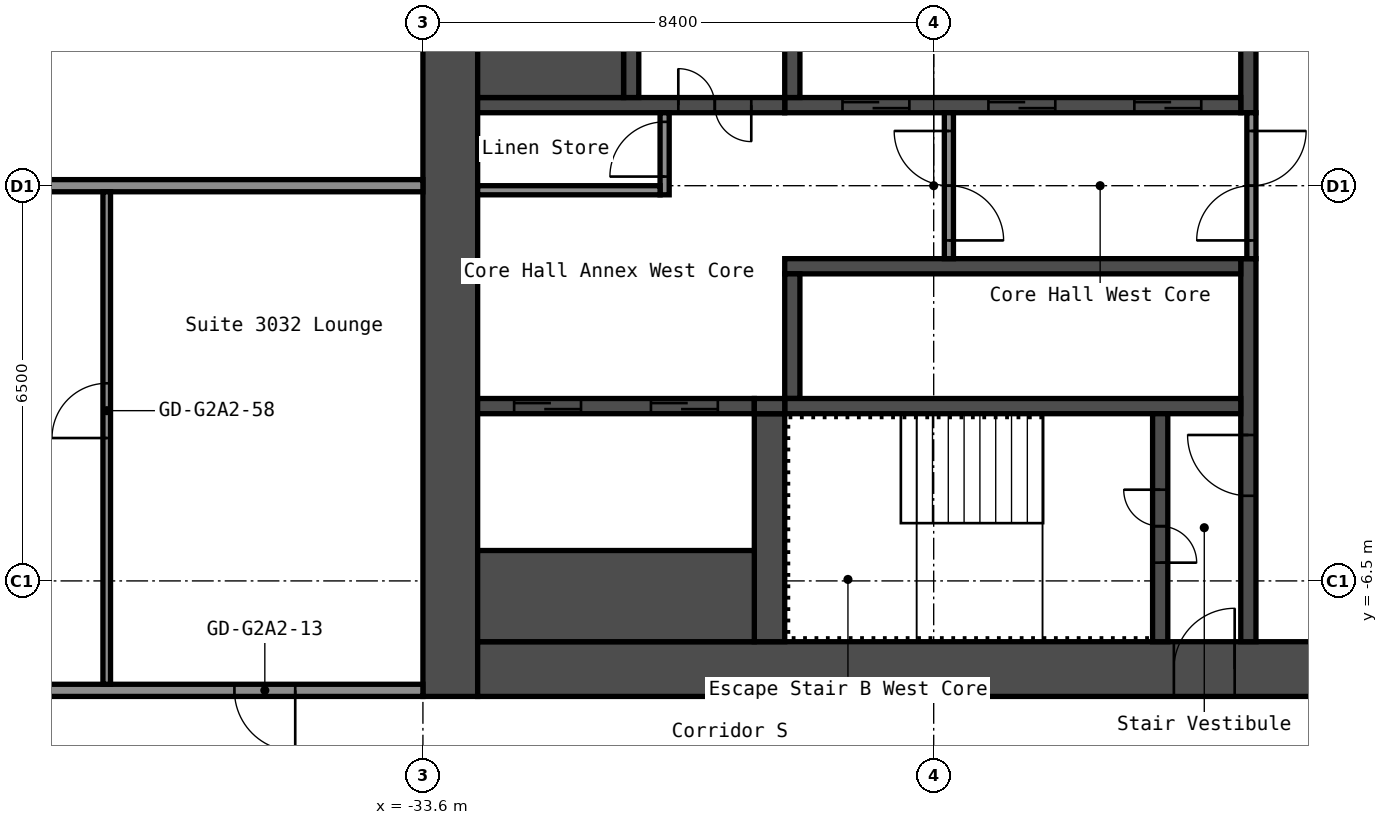
"""IFC4 building model, lengths in metres.
Left out: names, types, materials, properties, quantities, classifications, styles, units other than length and angle.
Written with IfcOpenShell. Run it as: python <this file> out.ifc"""

import sys

from ifc_helpers import new_model, si_unit, direction, frame, frame_2d, origin, place, context, subcontext, project, spatial, rectangle, extrude, element, fill, save


model = new_model("IFC4")
c1 = context("Model", 3, precision=1e-05, world=origin(), true_north=direction((0.0, 1.0)))
c2 = subcontext(c1, "Body", "Model", "MODEL_VIEW")
j1 = project(units=[si_unit("LENGTHUNIT", "METRE"), si_unit("PLANEANGLEUNIT", "RADIAN")], contexts=[c1])
p1 = place(None, origin())
s1 = spatial("IfcSite", under=j1, at=p1, CompositionType="ELEMENT")
p2 = place(p1, origin())
s2 = spatial("IfcBuilding", under=s1, at=p2, CompositionType="ELEMENT")
p3 = place(p2, frame((0.0, 0.0, 107.4)))
s3 = spatial("IfcBuildingStorey", under=s2, at=p3, CompositionType="ELEMENT", Elevation=107.4)
p4 = place(p3, frame((-33.15, -8.4, 0.0), z_axis=(0.0, 0.0, 1.0), x_axis=(0.0, 1.0, 0.0)))
e1 = element("IfcWall", 1, at=p4, inside=s3, PredefinedType="SHEAR", context=c2, shape_type="SweptSolid", body=[
    extrude(rectangle(XDim=16.8, YDim=0.9, at=frame_2d((8.4, 0.0))), origin(), (0.0, 0.0, 1.0), 2.8),
])
p5 = place(p3, frame((-32.7, -7.95, 0.0), z_axis=(0.0, 0.0, 1.0), x_axis=(1.0, 0.0, 0.0)))
e2 = element("IfcWall", 2, at=p5, inside=s3, PredefinedType="SHEAR", context=c2, shape_type="SweptSolid", body=[
    extrude(rectangle(XDim=15.0, YDim=0.9, at=frame_2d((7.5, 0.0))), origin(), (0.0, 0.0, 1.0), 2.8),
])
p6 = place(p5, frame((11.45, 0.0, 0.0)))
e3 = element("IfcOpeningElement", 3, at=p6, cuts=e2, PredefinedType="OPENING", context=c2, shape_type="SweptSolid", body=[
    extrude(rectangle(XDim=1.0, YDim=2.1, at=frame_2d((0.5, 1.05))), frame((0.0, 0.46, 0.0), z_axis=(0.0, -1.0, 0.0), x_axis=(1.0, 0.0, 0.0)), (0.0, 0.0, 1.0), 0.92),
])
p7 = place(p3, frame((-20.025, 1.2, 0.0), z_axis=(0.0, 0.0, 1.0), x_axis=(0.0, 1.0, 0.0)))
e4 = element("IfcWall", 4, at=p7, inside=s3, PredefinedType="SHEAR", context=c2, shape_type="SweptSolid", body=[
    extrude(rectangle(XDim=6.3, YDim=0.25, at=frame_2d((3.15, 0.0))), origin(), (0.0, 0.0, 1.0), 2.8),
])
p8 = place(p3, frame((-20.025, -7.5, 0.0), z_axis=(0.0, 0.0, 1.0), x_axis=(0.0, 1.0, 0.0)))
e5 = element("IfcWall", 5, at=p8, inside=s3, PredefinedType="SHEAR", context=c2, shape_type="SweptSolid", body=[
    extrude(rectangle(XDim=6.3, YDim=0.25, at=frame_2d((3.15, 0.0))), origin(), (0.0, 0.0, 1.0), 2.8),
])
p9 = place(p8, frame((2.4, 0.0, 0.0)))
e6 = element("IfcOpeningElement", 6, at=p9, cuts=e5, PredefinedType="OPENING", context=c2, shape_type="SweptSolid", body=[
    extrude(rectangle(XDim=1.0, YDim=2.1, at=frame_2d((0.5, 1.05))), frame((0.0, 0.135, 0.0), z_axis=(0.0, -1.0, 0.0), x_axis=(1.0, 0.0, 0.0)), (0.0, 0.0, 1.0), 0.27),
])
p10 = place(p3, frame((-27.65, 1.325, 0.0), z_axis=(0.0, 0.0, 1.0), x_axis=(1.0, 0.0, 0.0)))
e7 = element("IfcWall", 7, at=p10, inside=s3, PredefinedType="SHEAR", context=c2, shape_type="SweptSolid", body=[
    extrude(rectangle(XDim=7.5, YDim=0.25, at=frame_2d((3.75, 0.0))), origin(), (0.0, 0.0, 1.0), 2.8),
])
p11 = place(p10, frame((5.75, 0.0, 0.0)))
e8 = element("IfcOpeningElement", 8, at=p11, cuts=e7, PredefinedType="OPENING", context=c2, shape_type="SweptSolid", body=[
    extrude(rectangle(XDim=1.1, YDim=2.1, at=frame_2d((0.55, 1.05))), frame((0.0, 0.135, 0.0), z_axis=(0.0, -1.0, 0.0), x_axis=(1.0, 0.0, 0.0)), (0.0, 0.0, 1.0), 0.27),
])
p12 = place(p10, frame((3.35, 0.0, 0.0)))
e9 = element("IfcOpeningElement", 9, at=p12, cuts=e7, PredefinedType="OPENING", context=c2, shape_type="SweptSolid", body=[
    extrude(rectangle(XDim=1.1, YDim=2.1, at=frame_2d((0.55, 1.05))), frame((0.0, 0.135, 0.0), z_axis=(0.0, -1.0, 0.0), x_axis=(1.0, 0.0, 0.0)), (0.0, 0.0, 1.0), 0.27),
])
p13 = place(p10, frame((0.95, 0.0, 0.0)))
e10 = element("IfcOpeningElement", 10, at=p13, cuts=e7, PredefinedType="OPENING", context=c2, shape_type="SweptSolid", body=[
    extrude(rectangle(XDim=1.1, YDim=2.1, at=frame_2d((0.55, 1.05))), frame((0.0, 0.135, 0.0), z_axis=(0.0, -1.0, 0.0), x_axis=(1.0, 0.0, 0.0)), (0.0, 0.0, 1.0), 0.27),
])
p14 = place(p3, frame((-27.525, 1.45, 0.0), z_axis=(0.0, 0.0, 1.0), x_axis=(0.0, 1.0, 0.0)))
e11 = element("IfcWall", 11, at=p14, inside=s3, PredefinedType="SHEAR", context=c2, shape_type="SweptSolid", body=[
    extrude(rectangle(XDim=2.05, YDim=0.25, at=frame_2d((1.025, 0.0))), origin(), (0.0, 0.0, 1.0), 2.8),
])
p15 = place(p3, frame((-32.7, 1.325, 0.0), z_axis=(0.0, 0.0, 1.0), x_axis=(1.0, 0.0, 0.0)))
e12 = element("IfcWall", 12, at=p15, inside=s3, PredefinedType="SHEAR", context=c2, shape_type="SweptSolid", body=[
    extrude(rectangle(XDim=5.05, YDim=0.25, at=frame_2d((2.525, 0.0))), origin(), (0.0, 0.0, 1.0), 2.8),
])
p16 = place(p15, frame((3.3, 0.0, 0.0)))
e13 = element("IfcOpeningElement", 13, at=p16, cuts=e12, PredefinedType="OPENING", context=c2, shape_type="SweptSolid", body=[
    extrude(rectangle(XDim=1.2, YDim=2.1, at=frame_2d((0.6, 1.05))), frame((0.0, 0.135, 0.0), z_axis=(0.0, -1.0, 0.0), x_axis=(1.0, 0.0, 0.0)), (0.0, 0.0, 1.0), 0.27),
])
p17 = place(p3, frame((-30.175, 1.45, 0.0), z_axis=(0.0, 0.0, 1.0), x_axis=(0.0, 1.0, 0.0)))
e14 = element("IfcWall", 14, at=p17, inside=s3, PredefinedType="SHEAR", context=c2, shape_type="SweptSolid", body=[
    extrude(rectangle(XDim=6.05, YDim=0.25, at=frame_2d((3.025, 0.0))), origin(), (0.0, 0.0, 1.0), 2.8),
])
p18 = place(p17, frame((2.625, 0.0, 0.0)))
e15 = element("IfcOpeningElement", 15, at=p18, cuts=e14, PredefinedType="OPENING", context=c2, shape_type="SweptSolid", body=[
    extrude(rectangle(XDim=1.1, YDim=2.1, at=frame_2d((0.55, 1.05))), frame((0.0, 0.135, 0.0), z_axis=(0.0, -1.0, 0.0), x_axis=(1.0, 0.0, 0.0)), (0.0, 0.0, 1.0), 0.27),
])
p19 = place(p3, frame((-32.7, 2.375, 0.0), z_axis=(0.0, 0.0, 1.0), x_axis=(1.0, 0.0, 0.0)))
e16 = element("IfcWall", 16, at=p19, inside=s3, PredefinedType="SHEAR", context=c2, shape_type="SweptSolid", body=[
    extrude(rectangle(XDim=2.4, YDim=1.85, at=frame_2d((1.2, 0.0))), origin(), (0.0, 0.0, 1.0), 2.8),
])
p20 = place(p3, frame((-27.65, -1.325, 0.0), z_axis=(0.0, 0.0, 1.0), x_axis=(1.0, 0.0, 0.0)))
e17 = element("IfcWall", 17, at=p20, inside=s3, PredefinedType="SHEAR", context=c2, shape_type="SweptSolid", body=[
    extrude(rectangle(XDim=7.5, YDim=0.25, at=frame_2d((3.75, 0.0))), origin(), (0.0, 0.0, 1.0), 2.8),
])
p21 = place(p3, frame((-27.525, -3.5, 0.0), z_axis=(0.0, 0.0, 1.0), x_axis=(0.0, 1.0, 0.0)))
e18 = element("IfcWall", 18, at=p21, inside=s3, PredefinedType="SHEAR", context=c2, shape_type="SweptSolid", body=[
    extrude(rectangle(XDim=2.05, YDim=0.25, at=frame_2d((1.025, 0.0))), origin(), (0.0, 0.0, 1.0), 2.8),
])
p22 = place(p3, frame((-27.65, -3.625, 0.0), z_axis=(0.0, 0.0, 1.0), x_axis=(1.0, 0.0, 0.0)))
e19 = element("IfcWall", 19, at=p22, inside=s3, PredefinedType="SHEAR", context=c2, shape_type="SweptSolid", body=[
    extrude(rectangle(XDim=7.5, YDim=0.25, at=frame_2d((3.75, 0.0))), origin(), (0.0, 0.0, 1.0), 2.8),
])
p23 = place(p3, frame((-21.475, -7.5, 0.0), z_axis=(0.0, 0.0, 1.0), x_axis=(0.0, 1.0, 0.0)))
e20 = element("IfcWall", 20, at=p23, inside=s3, PredefinedType="SHEAR", context=c2, shape_type="SweptSolid", body=[
    extrude(rectangle(XDim=3.75, YDim=0.25, at=frame_2d((1.875, 0.0))), origin(), (0.0, 0.0, 1.0), 2.8),
])
p24 = place(p23, frame((1.3, 0.0, 0.0)))
e21 = element("IfcOpeningElement", 21, at=p24, cuts=e20, PredefinedType="OPENING", context=c2, shape_type="SweptSolid", body=[
    extrude(rectangle(XDim=1.2, YDim=2.1, at=frame_2d((0.6, 1.05))), frame((0.0, 0.135, 0.0), z_axis=(0.0, -1.0, 0.0), x_axis=(1.0, 0.0, 0.0)), (0.0, 0.0, 1.0), 0.27),
])
p25 = place(p3, frame((-27.9, -7.5, 0.0), z_axis=(0.0, 0.0, 1.0), x_axis=(0.0, 1.0, 0.0)))
e22 = element("IfcWall", 22, at=p25, inside=s3, PredefinedType="SHEAR", context=c2, shape_type="SweptSolid", body=[
    extrude(rectangle(XDim=3.75, YDim=0.5, at=frame_2d((1.875, 0.0))), origin(), (0.0, 0.0, 1.0), 2.8),
])
p26 = place(p3, frame((-32.7, -3.625, 0.0), z_axis=(0.0, 0.0, 1.0), x_axis=(1.0, 0.0, 0.0)))
e23 = element("IfcWall", 23, at=p26, inside=s3, PredefinedType="SHEAR", context=c2, shape_type="SweptSolid", body=[
    extrude(rectangle(XDim=4.55, YDim=0.25, at=frame_2d((2.275, 0.0))), origin(), (0.0, 0.0, 1.0), 2.8),
])
p27 = place(p26, frame((2.85, 0.0, 0.0)))
e24 = element("IfcOpeningElement", 24, at=p27, cuts=e23, PredefinedType="OPENING", context=c2, shape_type="SweptSolid", body=[
    extrude(rectangle(XDim=1.1, YDim=2.1, at=frame_2d((0.55, 1.05))), frame((0.0, 0.135, 0.0), z_axis=(0.0, -1.0, 0.0), x_axis=(1.0, 0.0, 0.0)), (0.0, 0.0, 1.0), 0.27),
])
p28 = place(p26, frame((0.6, 0.0, 0.0)))
e25 = element("IfcOpeningElement", 25, at=p28, cuts=e23, PredefinedType="OPENING", context=c2, shape_type="SweptSolid", body=[
    extrude(rectangle(XDim=1.1, YDim=2.1, at=frame_2d((0.55, 1.05))), frame((0.0, 0.135, 0.0), z_axis=(0.0, -1.0, 0.0), x_axis=(1.0, 0.0, 0.0)), (0.0, 0.0, 1.0), 0.27),
])
p29 = place(p3, frame((-32.7, -6.75, 0.0), z_axis=(0.0, 0.0, 1.0), x_axis=(1.0, 0.0, 0.0)))
e26 = element("IfcWall", 26, at=p29, inside=s3, PredefinedType="SHEAR", context=c2, shape_type="SweptSolid", body=[
    extrude(rectangle(XDim=4.55, YDim=1.5, at=frame_2d((2.275, 0.0))), origin(), (0.0, 0.0, 1.0), 2.8),
])
p30 = place(p3, frame((-28.15, -3.625, 0.0), z_axis=(0.0, 0.0, 1.0), x_axis=(1.0, 0.0, 0.0)))
e27 = element("IfcWall", 27, at=p30, inside=s3, PredefinedType="SHEAR", context=c2, shape_type="SweptSolid", body=[
    extrude(rectangle(XDim=0.5, YDim=0.25, at=frame_2d((0.25, 0.0))), origin(), (0.0, 0.0, 1.0), 2.8),
])
p31 = place(p3, frame((-19.975, -1.2, 0.0), z_axis=(0.0, 0.0, 1.0), x_axis=(0.0, 1.0, 0.0)))
e28 = element("IfcWall", 28, at=p31, inside=s3, PredefinedType="PARTITIONING", context=c2, shape_type="SweptSolid", body=[
    extrude(rectangle(XDim=2.4, YDim=0.15, at=frame_2d((1.2, 0.0))), origin(), (0.0, 0.0, 1.0), 2.8),
])
p32 = place(p31, frame((0.3, 0.0, 0.0)))
e29 = element("IfcOpeningElement", 29, at=p32, cuts=e28, PredefinedType="OPENING", context=c2, shape_type="SweptSolid", body=[
    extrude(rectangle(XDim=1.8, YDim=2.1, at=frame_2d((0.9, 1.05))), frame((0.0, 0.085, 0.0), z_axis=(0.0, -1.0, 0.0), x_axis=(1.0, 0.0, 0.0)), (0.0, 0.0, 1.0), 0.17),
])
p33 = place(p3, frame((-24.95, -1.2, 0.0), z_axis=(0.0, 0.0, 1.0), x_axis=(0.0, 1.0, 0.0)))
e30 = element("IfcWall", 30, at=p33, inside=s3, PredefinedType="PARTITIONING", context=c2, shape_type="SweptSolid", body=[
    extrude(rectangle(XDim=2.4, YDim=0.15, at=frame_2d((1.2, 0.0))), origin(), (0.0, 0.0, 1.0), 2.8),
])
p34 = place(p33, frame((0.3, 0.0, 0.0)))
e31 = element("IfcOpeningElement", 31, at=p34, cuts=e30, PredefinedType="OPENING", context=c2, shape_type="SweptSolid", body=[
    extrude(rectangle(XDim=1.8, YDim=2.1, at=frame_2d((0.9, 1.05))), frame((0.0, 0.085, 0.0), z_axis=(0.0, -1.0, 0.0), x_axis=(1.0, 0.0, 0.0)), (0.0, 0.0, 1.0), 0.17),
])
p35 = place(p3, frame((-29.625, -0.15, 0.0), z_axis=(0.0, 0.0, 1.0), x_axis=(0.0, 1.0, 0.0)))
e32 = element("IfcWall", 32, at=p35, inside=s3, PredefinedType="PARTITIONING", context=c2, shape_type="SweptSolid", body=[
    extrude(rectangle(XDim=1.35, YDim=0.15, at=frame_2d((0.675, 0.0))), origin(), (0.0, 0.0, 1.0), 2.8),
])
p36 = place(p35, frame((0.3, 0.0, 0.0)))
e33 = element("IfcOpeningElement", 33, at=p36, cuts=e32, PredefinedType="OPENING", context=c2, shape_type="SweptSolid", body=[
    extrude(rectangle(XDim=0.9, YDim=2.1, at=frame_2d((0.45, 1.05))), frame((0.0, 0.085, 0.0), z_axis=(0.0, -1.0, 0.0), x_axis=(1.0, 0.0, 0.0)), (0.0, 0.0, 1.0), 0.17),
])
p37 = place(p3, frame((-32.7, -0.075, 0.0), z_axis=(0.0, 0.0, 1.0), x_axis=(1.0, 0.0, 0.0)))
e34 = element("IfcWall", 34, at=p37, inside=s3, PredefinedType="PARTITIONING", context=c2, shape_type="SweptSolid", body=[
    extrude(rectangle(XDim=3.0, YDim=0.15, at=frame_2d((1.5, 0.0))), origin(), (0.0, 0.0, 1.0), 2.8),
])
p38 = place(p3, frame((-44.0, -8.3, 0.0), z_axis=(0.0, 0.0, 1.0), x_axis=(1.0, 0.0, 0.0)))
e35 = element("IfcWall", 35, at=p38, inside=s3, PredefinedType="PARTITIONING", context=c2, shape_type="SweptSolid", body=[
    extrude(rectangle(XDim=10.4, YDim=0.2, at=frame_2d((5.2, 0.0))), origin(), (0.0, 0.0, 1.0), 2.8),
])
p39 = place(p38, frame((7.3, 0.0, 0.0)))
e36 = element("IfcOpeningElement", 36, at=p39, cuts=e35, PredefinedType="OPENING", context=c2, shape_type="SweptSolid", body=[
    extrude(rectangle(XDim=1.0, YDim=2.1, at=frame_2d((0.5, 1.05))), frame((0.0, 0.11, 0.0), z_axis=(0.0, -1.0, 0.0), x_axis=(1.0, 0.0, 0.0)), (0.0, 0.0, 1.0), 0.22),
])
p40 = place(p3, frame((-43.9, 0.0, 0.0), z_axis=(0.0, 0.0, 1.0), x_axis=(1.0, 0.0, 0.0)))
e37 = element("IfcWall", 37, at=p40, inside=s3, PredefinedType="PARTITIONING", context=c2, shape_type="SweptSolid", body=[
    extrude(rectangle(XDim=10.3, YDim=0.2, at=frame_2d((5.15, 0.0))), origin(), (0.0, 0.0, 1.0), 2.8),
])
p41 = place(p3, frame((-38.8, -8.2, 0.0), z_axis=(0.0, 0.0, 1.0), x_axis=(0.0, 1.0, 0.0)))
e38 = element("IfcWall", 38, at=p41, inside=s3, PredefinedType="PARTITIONING", context=c2, shape_type="SweptSolid", body=[
    extrude(rectangle(XDim=8.1, YDim=0.125, at=frame_2d((4.05, 0.0))), origin(), (0.0, 0.0, 1.0), 2.8),
])
p42 = place(p41, frame((4.05, 0.0, 0.0)))
e39 = element("IfcOpeningElement", 39, at=p42, cuts=e38, PredefinedType="OPENING", context=c2, shape_type="SweptSolid", body=[
    extrude(rectangle(XDim=0.9, YDim=2.1, at=frame_2d((0.45, 1.05))), frame((0.0, 0.073, 0.0), z_axis=(0.0, -1.0, 0.0), x_axis=(1.0, 0.0, 0.0)), (0.0, 0.0, 1.0), 0.145),
])
p43 = place(p6, origin())
e40 = element("IfcDoor", 40, at=p43, inside=s3, OperationType="SINGLE_SWING_LEFT", PredefinedType="DOOR", context=c2, shape_type="SweptSolid", body=[
    extrude(rectangle(XDim=1.0, YDim=2.1, at=frame_2d((0.5, 1.05))), frame((0.0, 0.025, 0.0), z_axis=(0.0, -1.0, 0.0), x_axis=(1.0, 0.0, 0.0)), (0.0, 0.0, 1.0), 0.05),
])
fill(e3, e40)
p44 = place(p24, origin())
e41 = element("IfcDoor", 41, at=p44, inside=s3, OperationType="DOUBLE_DOOR_SINGLE_SWING", PredefinedType="DOOR", context=c2, shape_type="SweptSolid", body=[
    extrude(rectangle(XDim=1.2, YDim=2.1, at=frame_2d((0.6, 1.05))), frame((0.0, 0.025, 0.0), z_axis=(0.0, -1.0, 0.0), x_axis=(1.0, 0.0, 0.0)), (0.0, 0.0, 1.0), 0.05),
])
fill(e21, e41)
p45 = place(p9, origin())
e42 = element("IfcDoor", 42, at=p45, inside=s3, OperationType="SINGLE_SWING_LEFT", PredefinedType="DOOR", context=c2, shape_type="SweptSolid", body=[
    extrude(rectangle(XDim=1.0, YDim=2.1, at=frame_2d((0.5, 1.05))), frame((0.0, 0.025, 0.0), z_axis=(0.0, -1.0, 0.0), x_axis=(1.0, 0.0, 0.0)), (0.0, 0.0, 1.0), 0.05),
])
fill(e6, e42)
p46 = place(p16, origin())
e43 = element("IfcDoor", 43, at=p46, inside=s3, OperationType="DOUBLE_DOOR_SINGLE_SWING", PredefinedType="DOOR", context=c2, shape_type="SweptSolid", body=[
    extrude(rectangle(XDim=1.2, YDim=2.1, at=frame_2d((0.6, 1.05))), frame((0.0, 0.025, 0.0), z_axis=(0.0, -1.0, 0.0), x_axis=(1.0, 0.0, 0.0)), (0.0, 0.0, 1.0), 0.05),
])
fill(e13, e43)
p47 = place(p32, origin())
e44 = element("IfcDoor", 44, at=p47, inside=s3, OperationType="DOUBLE_DOOR_SINGLE_SWING", PredefinedType="DOOR", context=c2, shape_type="SweptSolid", body=[
    extrude(rectangle(XDim=1.8, YDim=2.1, at=frame_2d((0.9, 1.05))), frame((0.0, 0.025, 0.0), z_axis=(0.0, -1.0, 0.0), x_axis=(1.0, 0.0, 0.0)), (0.0, 0.0, 1.0), 0.05),
])
fill(e29, e44)
p48 = place(p34, origin())
e45 = element("IfcDoor", 45, at=p48, inside=s3, OperationType="DOUBLE_DOOR_SINGLE_SWING", PredefinedType="DOOR", context=c2, shape_type="SweptSolid", body=[
    extrude(rectangle(XDim=1.8, YDim=2.1, at=frame_2d((0.9, 1.05))), frame((0.0, 0.025, 0.0), z_axis=(0.0, -1.0, 0.0), x_axis=(1.0, 0.0, 0.0)), (0.0, 0.0, 1.0), 0.05),
])
fill(e31, e45)
p49 = place(p36, origin())
e46 = element("IfcDoor", 46, at=p49, inside=s3, OperationType="SINGLE_SWING_RIGHT", PredefinedType="DOOR", context=c2, shape_type="SweptSolid", body=[
    extrude(rectangle(XDim=0.9, YDim=2.1, at=frame_2d((0.45, 1.05))), frame((0.0, 0.025, 0.0), z_axis=(0.0, -1.0, 0.0), x_axis=(1.0, 0.0, 0.0)), (0.0, 0.0, 1.0), 0.05),
])
fill(e33, e46)
p50 = place(p11, origin())
e47 = element("IfcDoor", 47, at=p50, inside=s3, OperationType="DOUBLE_DOOR_SLIDING", PredefinedType="DOOR", context=c2, shape_type="SweptSolid", body=[
    extrude(rectangle(XDim=1.1, YDim=2.1, at=frame_2d((0.55, 1.05))), frame((0.0, 0.025, 0.0), z_axis=(0.0, -1.0, 0.0), x_axis=(1.0, 0.0, 0.0)), (0.0, 0.0, 1.0), 0.05),
])
fill(e8, e47)
p51 = place(p12, origin())
e48 = element("IfcDoor", 48, at=p51, inside=s3, OperationType="DOUBLE_DOOR_SLIDING", PredefinedType="DOOR", context=c2, shape_type="SweptSolid", body=[
    extrude(rectangle(XDim=1.1, YDim=2.1, at=frame_2d((0.55, 1.05))), frame((0.0, 0.025, 0.0), z_axis=(0.0, -1.0, 0.0), x_axis=(1.0, 0.0, 0.0)), (0.0, 0.0, 1.0), 0.05),
])
fill(e9, e48)
p52 = place(p13, origin())
e49 = element("IfcDoor", 49, at=p52, inside=s3, OperationType="DOUBLE_DOOR_SLIDING", PredefinedType="DOOR", context=c2, shape_type="SweptSolid", body=[
    extrude(rectangle(XDim=1.1, YDim=2.1, at=frame_2d((0.55, 1.05))), frame((0.0, 0.025, 0.0), z_axis=(0.0, -1.0, 0.0), x_axis=(1.0, 0.0, 0.0)), (0.0, 0.0, 1.0), 0.05),
])
fill(e10, e49)
p53 = place(p27, origin())
e50 = element("IfcDoor", 50, at=p53, inside=s3, OperationType="DOUBLE_DOOR_SLIDING", PredefinedType="DOOR", context=c2, shape_type="SweptSolid", body=[
    extrude(rectangle(XDim=1.1, YDim=2.1, at=frame_2d((0.55, 1.05))), frame((0.0, 0.025, 0.0), z_axis=(0.0, -1.0, 0.0), x_axis=(1.0, 0.0, 0.0)), (0.0, 0.0, 1.0), 0.05),
])
fill(e24, e50)
p54 = place(p28, origin())
e51 = element("IfcDoor", 51, at=p54, inside=s3, OperationType="DOUBLE_DOOR_SLIDING", PredefinedType="DOOR", context=c2, shape_type="SweptSolid", body=[
    extrude(rectangle(XDim=1.1, YDim=2.1, at=frame_2d((0.55, 1.05))), frame((0.0, 0.025, 0.0), z_axis=(0.0, -1.0, 0.0), x_axis=(1.0, 0.0, 0.0)), (0.0, 0.0, 1.0), 0.05),
])
fill(e25, e51)
p55 = place(p39, origin())
e52 = element("IfcDoor", 52, at=p55, inside=s3, OperationType="SINGLE_SWING_RIGHT", PredefinedType="DOOR", context=c2, shape_type="SweptSolid", body=[
    extrude(rectangle(XDim=1.0, YDim=2.1, at=frame_2d((0.5, 1.05))), frame((0.0, 0.025, 0.0), z_axis=(0.0, -1.0, 0.0), x_axis=(1.0, 0.0, 0.0)), (0.0, 0.0, 1.0), 0.05),
])
fill(e36, e52)
p56 = place(p42, origin())
e53 = element("IfcDoor", 53, at=p56, inside=s3, OperationType="SINGLE_SWING_RIGHT", PredefinedType="DOOR", context=c2, shape_type="SweptSolid", body=[
    extrude(rectangle(XDim=0.9, YDim=2.1, at=frame_2d((0.45, 1.05))), frame((0.0, 0.025, 0.0), z_axis=(0.0, -1.0, 0.0), x_axis=(1.0, 0.0, 0.0)), (0.0, 0.0, 1.0), 0.05),
])
fill(e39, e53)
save(model, sys.argv[1])
